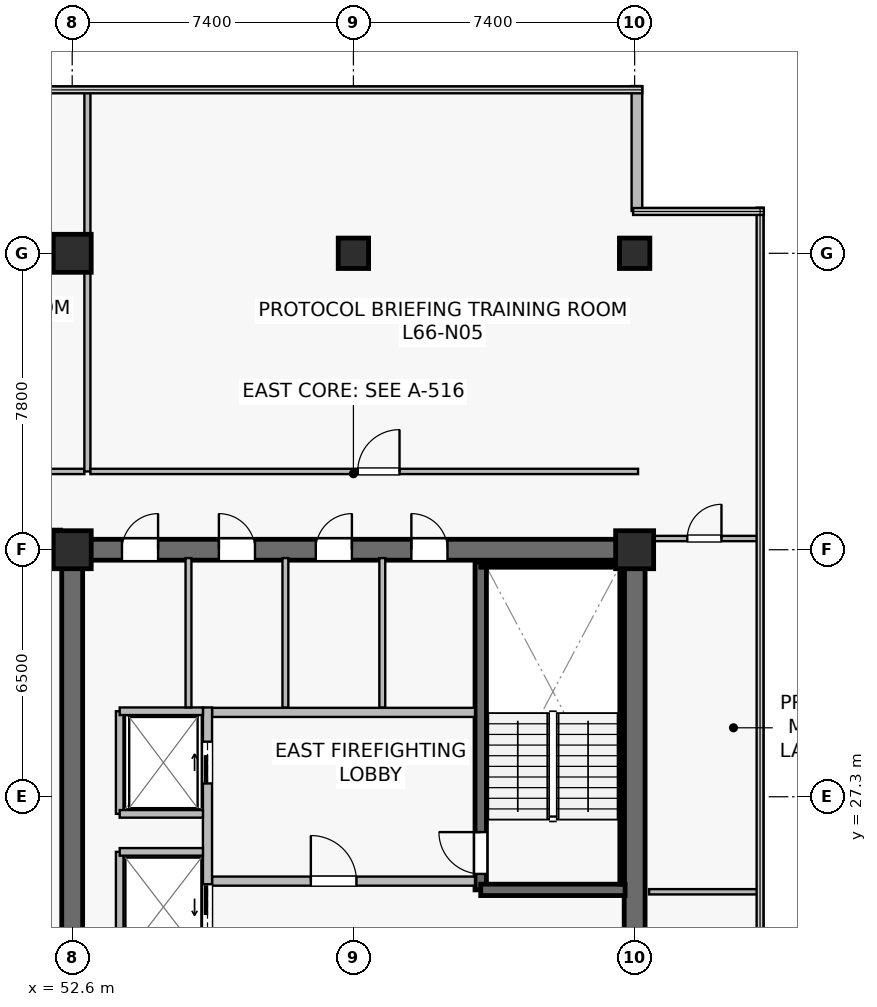
"""IFC4 building model, lengths in metres.
Left out: names, types, materials, properties, quantities, classifications, styles, units other than length and angle.
Written with IfcOpenShell. Run it as: python <this file> out.ifc"""

import sys

from ifc_helpers import new_model, si_unit, direction, frame, frame_2d, origin, origin_2d, place, context, subcontext, project, spatial, rectangle, extrude, source, transform, mapped, element, fill, save


model = new_model("IFC4")
c1 = context("Model", 3, precision=1e-05, world=origin(), true_north=direction((0.0, 1.0)))
c2 = subcontext(c1, "Body", "Model", "MODEL_VIEW")
j1 = project(units=[si_unit("LENGTHUNIT", "METRE"), si_unit("PLANEANGLEUNIT", "RADIAN")], contexts=[c1])
p1 = place(None, origin())
s1 = spatial("IfcSite", under=j1, at=p1, CompositionType="ELEMENT")
p2 = place(p1, origin())
s2 = spatial("IfcBuilding", under=s1, at=p2, CompositionType="ELEMENT")
p3 = place(p2, frame((0.0, 0.0, 275.2)))
s3 = spatial("IfcBuildingStorey", under=s2, at=p3, CompositionType="ELEMENT", Elevation=275.2)
p4 = place(p3, frame((52.325, 33.8, 0.0), z_axis=(0.0, 0.0, 1.0), x_axis=(1.0, 0.0, 0.0)))
e1 = element("IfcWall", 1, at=p4, inside=s3, PredefinedType="SHEAR", context=c2, shape_type="SweptSolid", body=[
    extrude(rectangle(XDim=15.35, YDim=0.55, at=frame_2d((7.675, 0.0))), origin(), (0.0, 0.0, 1.0), 3.8),
])
p5 = place(p4, frame((9.2, 0.0, 0.0)))
e2 = element("IfcOpeningElement", 2, at=p5, cuts=e1, PredefinedType="OPENING", context=c2, shape_type="SweptSolid", body=[
    extrude(rectangle(XDim=0.95, YDim=2.15, at=frame_2d((0.475, 1.075))), frame((0.0, 0.285, 0.0), z_axis=(0.0, -1.0, 0.0), x_axis=(1.0, 0.0, 0.0)), (0.0, 0.0, 1.0), 0.57),
])
p6 = place(p4, frame((6.685, 0.0, 0.0)))
e3 = element("IfcOpeningElement", 3, at=p6, cuts=e1, PredefinedType="OPENING", context=c2, shape_type="SweptSolid", body=[
    extrude(rectangle(XDim=0.95, YDim=2.15, at=frame_2d((0.475, 1.075))), frame((0.0, 0.285, 0.0), z_axis=(0.0, -1.0, 0.0), x_axis=(1.0, 0.0, 0.0)), (0.0, 0.0, 1.0), 0.57),
])
p7 = place(p4, frame((4.135, 0.0, 0.0)))
e4 = element("IfcOpeningElement", 4, at=p7, cuts=e1, PredefinedType="OPENING", context=c2, shape_type="SweptSolid", body=[
    extrude(rectangle(XDim=0.95, YDim=2.15, at=frame_2d((0.475, 1.075))), frame((0.0, 0.285, 0.0), z_axis=(0.0, -1.0, 0.0), x_axis=(1.0, 0.0, 0.0)), (0.0, 0.0, 1.0), 0.57),
])
p8 = place(p4, frame((1.585, 0.0, 0.0)))
e5 = element("IfcOpeningElement", 5, at=p8, cuts=e1, PredefinedType="OPENING", context=c2, shape_type="SweptSolid", body=[
    extrude(rectangle(XDim=0.95, YDim=2.15, at=frame_2d((0.475, 1.075))), frame((0.0, 0.285, 0.0), z_axis=(0.0, -1.0, 0.0), x_axis=(1.0, 0.0, 0.0)), (0.0, 0.0, 1.0), 0.57),
])
p9 = place(p3, frame((52.6, 15.075, 0.0), z_axis=(0.0, 0.0, 1.0), x_axis=(0.0, 1.0, 0.0)))
e6 = element("IfcWall", 6, at=p9, inside=s3, PredefinedType="SHEAR", context=c2, shape_type="SweptSolid", body=[
    extrude(rectangle(XDim=18.45, YDim=0.55, at=frame_2d((9.225, 0.0))), origin(), (0.0, 0.0, 1.0), 3.8),
])
p10 = place(p9, frame((3.475, 0.0, 0.0)))
e7 = element("IfcOpeningElement", 7, at=p10, cuts=e6, PredefinedType="OPENING", context=c2, shape_type="SweptSolid", body=[
    extrude(rectangle(XDim=1.42, YDim=2.2, at=frame_2d((0.71, 1.1))), frame((0.0, 0.285, 0.0), z_axis=(0.0, -1.0, 0.0), x_axis=(1.0, 0.0, 0.0)), (0.0, 0.0, 1.0), 0.57),
])
p11 = place(p3, frame((67.4, 15.075, 0.0), z_axis=(0.0, 0.0, 1.0), x_axis=(0.0, 1.0, 0.0)))
e8 = element("IfcWall", 8, at=p11, inside=s3, PredefinedType="SHEAR", context=c2, shape_type="SweptSolid", body=[
    extrude(rectangle(XDim=18.45, YDim=0.55, at=frame_2d((9.225, 0.0))), origin(), (0.0, 0.0, 1.0), 3.8),
])
p12 = place(p3, frame((63.35, 24.85, 0.0), z_axis=(0.0, 0.0, 1.0), x_axis=(0.0, 1.0, 0.0)))
e9 = element("IfcWall", 9, at=p12, inside=s3, PredefinedType="SHEAR", context=c2, shape_type="SweptSolid", body=[
    extrude(rectangle(XDim=8.63, YDim=0.3, at=frame_2d((4.315, 0.0))), origin(), (0.0, 0.0, 1.0), 3.8),
])
p13 = place(p12, frame((0.42, 0.0, 0.0)))
e10 = element("IfcOpeningElement", 10, at=p13, cuts=e9, PredefinedType="OPENING", context=c2, shape_type="SweptSolid", body=[
    extrude(rectangle(XDim=1.1, YDim=2.15, at=frame_2d((0.55, 1.075))), frame((0.0, 0.16, 0.0), z_axis=(0.0, -1.0, 0.0), x_axis=(1.0, 0.0, 0.0)), (0.0, 0.0, 1.0), 0.32),
])
p14 = place(p3, frame((63.35, 24.85, 0.0), z_axis=(0.0, 0.0, 1.0), x_axis=(1.0, 0.0, 0.0)))
e11 = element("IfcWall", 11, at=p14, inside=s3, PredefinedType="SHEAR", context=c2, shape_type="SweptSolid", body=[
    extrude(rectangle(XDim=3.8, YDim=0.3, at=frame_2d((1.9, 0.0))), origin(), (0.0, 0.0, 1.0), 3.8),
])
p15 = place(p3, frame((63.35, 33.4, 0.0), z_axis=(0.0, 0.0, 1.0), x_axis=(1.0, 0.0, 0.0)))
e12 = element("IfcWall", 12, at=p15, inside=s3, PredefinedType="SOLIDWALL", context=c2, shape_type="SweptSolid", body=[
    extrude(rectangle(XDim=3.72, YDim=0.12, at=frame_2d((1.86, 0.0))), origin(), (0.0, 0.0, 1.0), 3.8),
])
p16 = place(p3, frame((67.07, 25.0, 0.0), z_axis=(0.0, 0.0, 1.0), x_axis=(0.0, 1.0, 0.0)))
e13 = element("IfcWall", 13, at=p16, inside=s3, PredefinedType="SOLIDWALL", context=c2, shape_type="SweptSolid", body=[
    extrude(rectangle(XDim=8.32, YDim=0.12, at=frame_2d((4.16, 0.0))), origin(), (0.0, 0.0, 1.0), 3.8),
])
m1 = source(origin(), c2, "Body", "SweptSolid", [
    extrude(rectangle(XDim=1.0, YDim=1.0, at=origin_2d()), origin(), (0.0, 0.0, 1.0), 4.1),
])
for number, where, z_axis, x_axis in (
    (14, (52.6, 33.8, 0.0), (0.0, 0.0, 1.0), (1.0, 0.0, 0.0)),
    (15, (67.4, 33.8, 0.0), (0.0, 0.0, 1.0), (1.0, 0.0, 0.0)),
    (16, (52.6, 41.6, 0.0), (0.0, 0.0, 1.0), (1.0, 0.0, 0.0)),
):
    element("IfcColumn", number, at=place(p3, frame(where, z_axis=z_axis, x_axis=x_axis)), inside=s3, PredefinedType="COLUMN", context=c2, shape_type="MappedRepresentation", body=[
        mapped(m1, transform((0.0, 0.0, 0.0), scale=1.0)),
    ])
m2 = source(origin(), c2, "Body", "SweptSolid", [
    extrude(rectangle(XDim=0.8, YDim=0.8, at=origin_2d()), origin(), (0.0, 0.0, 1.0), 4.1),
])
for number, where, z_axis, x_axis in (
    (17, (60.0, 41.6, 0.0), (0.0, 0.0, 1.0), (1.0, 0.0, 0.0)),
    (18, (67.4, 41.6, 0.0), (0.0, 0.0, 1.0), (1.0, 0.0, 0.0)),
):
    element("IfcColumn", number, at=place(p3, frame(where, z_axis=z_axis, x_axis=x_axis)), inside=s3, PredefinedType="COLUMN", context=c2, shape_type="MappedRepresentation", body=[
        mapped(m2, transform((0.0, 0.0, 0.0), scale=1.0)),
    ])
p17 = place(p3, frame((67.46, 42.712, 0.0), z_axis=(0.0, 0.0, 1.0), x_axis=(0.0, 1.0, 0.0)))
e19 = element("IfcWall", 19, at=p17, inside=s3, PredefinedType="STANDARD", context=c2, shape_type="SweptSolid", body=[
    extrude(rectangle(XDim=3.288, YDim=0.28, at=frame_2d((1.644, 0.0))), origin(), (0.0, 0.0, 1.0), 3.8),
])
p18 = place(p3, frame((56.28, 25.08, 0.0), z_axis=(0.0, 0.0, 1.0), x_axis=(1.0, 0.0, 0.0)))
e20 = element("IfcWall", 20, at=p18, inside=s3, PredefinedType="SOLIDWALL", context=c2, shape_type="SweptSolid", body=[
    extrude(rectangle(XDim=6.92, YDim=0.24, at=frame_2d((3.46, 0.0))), origin(), (0.0, 0.0, 1.0), 3.197),
])
p19 = place(p18, frame((2.6, 0.0, 0.0)))
e21 = element("IfcOpeningElement", 21, at=p19, cuts=e20, PredefinedType="OPENING", context=c2, shape_type="SweptSolid", body=[
    extrude(rectangle(XDim=1.2, YDim=2.16, at=frame_2d((0.6, 1.08))), frame((0.0, 0.13, 0.0), z_axis=(0.0, -1.0, 0.0), x_axis=(1.0, 0.0, 0.0)), (0.0, 0.0, 1.0), 0.26),
])
p20 = place(p3, frame((56.28, 29.52, 0.0), z_axis=(0.0, 0.0, 1.0), x_axis=(1.0, 0.0, 0.0)))
e22 = element("IfcWall", 22, at=p20, inside=s3, PredefinedType="SOLIDWALL", context=c2, shape_type="SweptSolid", body=[
    extrude(rectangle(XDim=6.92, YDim=0.24, at=frame_2d((3.46, 0.0))), origin(), (0.0, 0.0, 1.0), 3.197),
])
p21 = place(p3, frame((56.16, 22.8, 0.0), z_axis=(0.0, 0.0, 1.0), x_axis=(0.0, 1.0, 0.0)))
e23 = element("IfcWall", 23, at=p21, inside=s3, PredefinedType="SOLIDWALL", context=c2, shape_type="SweptSolid", body=[
    extrude(rectangle(XDim=6.85, YDim=0.24, at=frame_2d((3.425, 0.0))), origin(), (0.0, 0.0, 1.0), 2.935),
])
p22 = place(p21, frame((4.85, 0.0, 0.0)))
e24 = element("IfcOpeningElement", 24, at=p22, cuts=e23, PredefinedType="OPENING", context=c2, shape_type="SweptSolid", body=[
    extrude(rectangle(XDim=1.1, YDim=2.22, at=frame_2d((0.55, 1.11))), frame((0.0, 0.13, 0.0), z_axis=(0.0, -1.0, 0.0), x_axis=(1.0, 0.0, 0.0)), (0.0, 0.0, 1.0), 0.26),
])
p23 = place(p21, frame((1.0, 0.0, 0.0)))
e25 = element("IfcOpeningElement", 25, at=p23, cuts=e23, PredefinedType="OPENING", context=c2, shape_type="SweptSolid", body=[
    extrude(rectangle(XDim=1.2, YDim=2.22, at=frame_2d((0.6, 1.11))), frame((0.0, 0.13, 0.0), z_axis=(0.0, -1.0, 0.0), x_axis=(1.0, 0.0, 0.0)), (0.0, 0.0, 1.0), 0.26),
])
p24 = place(p3, frame((53.85, 26.85, 0.0), z_axis=(0.0, 0.0, 1.0), x_axis=(0.0, 1.0, 0.0)))
e26 = element("IfcWall", 26, at=p24, inside=s3, PredefinedType="SOLIDWALL", context=c2, shape_type="SweptSolid", body=[
    extrude(rectangle(XDim=2.7, YDim=0.2, at=frame_2d((1.35, 0.0))), origin(), (0.0, 0.0, 1.0), 3.8),
])
p25 = place(p3, frame((53.85, 29.55, 0.0), z_axis=(0.0, 0.0, 1.0), x_axis=(1.0, 0.0, 0.0)))
e27 = element("IfcWall", 27, at=p25, inside=s3, PredefinedType="SOLIDWALL", context=c2, shape_type="SweptSolid", body=[
    extrude(rectangle(XDim=2.19, YDim=0.2, at=frame_2d((1.095, 0.0))), origin(), (0.0, 0.0, 1.0), 3.8),
])
p26 = place(p3, frame((53.85, 26.85, 0.0), z_axis=(0.0, 0.0, 1.0), x_axis=(1.0, 0.0, 0.0)))
e28 = element("IfcWall", 28, at=p26, inside=s3, PredefinedType="SOLIDWALL", context=c2, shape_type="SweptSolid", body=[
    extrude(rectangle(XDim=2.19, YDim=0.2, at=frame_2d((1.095, 0.0))), origin(), (0.0, 0.0, 1.0), 3.197),
])
p27 = place(p3, frame((53.85, 22.95, 0.0), z_axis=(0.0, 0.0, 1.0), x_axis=(0.0, 1.0, 0.0)))
e29 = element("IfcWall", 29, at=p27, inside=s3, PredefinedType="SOLIDWALL", context=c2, shape_type="SweptSolid", body=[
    extrude(rectangle(XDim=2.9, YDim=0.2, at=frame_2d((1.45, 0.0))), origin(), (0.0, 0.0, 1.0), 2.935),
])
p28 = place(p3, frame((53.85, 25.85, 0.0), z_axis=(0.0, 0.0, 1.0), x_axis=(1.0, 0.0, 0.0)))
e30 = element("IfcWall", 30, at=p28, inside=s3, PredefinedType="SOLIDWALL", context=c2, shape_type="SweptSolid", body=[
    extrude(rectangle(XDim=2.19, YDim=0.2, at=frame_2d((1.095, 0.0))), origin(), (0.0, 0.0, 1.0), 3.8),
])
for number, where, z_axis, x_axis in (
    (31, (60.76, 29.65, 0.0), (0.0, 0.0, 1.0), (0.0, 1.0, 0.0)),
    (32, (58.21, 29.65, 0.0), (0.0, 0.0, 1.0), (0.0, 1.0, 0.0)),
    (33, (55.66, 29.65, 0.0), (0.0, 0.0, 1.0), (0.0, 1.0, 0.0)),
):
    element("IfcWall", number, at=place(p3, frame(where, z_axis=z_axis, x_axis=x_axis)), inside=s3, PredefinedType="PLUMBINGWALL", context=c2, shape_type="SweptSolid", body=[
        extrude(rectangle(XDim=3.93, YDim=0.155, at=frame_2d((1.965, 0.0))), origin(), (0.0, 0.0, 1.0), 3.8),
    ])
p29 = place(p3, frame((48.3, 34.26, 0.0), z_axis=(0.0, 0.0, 1.0), x_axis=(1.0, 0.0, 0.0)))
e34 = element("IfcWall", 34, at=p29, inside=s3, PredefinedType="PARTITIONING", context=c2, shape_type="SweptSolid", body=[
    extrude(rectangle(XDim=4.025, YDim=0.175, at=frame_2d((2.012, 0.0))), origin(), (0.0, 0.0, 1.0), 3.535),
])
p30 = place(p3, frame((38.08, 35.86, 0.0), z_axis=(0.0, 0.0, 1.0), x_axis=(1.0, 0.0, 0.0)))
e35 = element("IfcWall", 35, at=p30, inside=s3, PredefinedType="PARTITIONING", context=c2, shape_type="SweptSolid", body=[
    extrude(rectangle(XDim=14.84, YDim=0.14, at=frame_2d((7.42, 0.0))), origin(), (0.0, 0.0, 1.0), 3.197),
])
p31 = place(p30, frame((5.696, 0.0, 0.0)))
e36 = element("IfcOpeningElement", 36, at=p31, cuts=e35, PredefinedType="OPENING", context=c2, shape_type="SweptSolid", body=[
    extrude(rectangle(XDim=1.1, YDim=2.18, at=frame_2d((0.55, 1.09))), frame((0.0, 0.08, 0.0), z_axis=(0.0, -1.0, 0.0), x_axis=(1.0, 0.0, 0.0)), (0.0, 0.0, 1.0), 0.16),
])
p32 = place(p3, frame((53.0, 35.86, 0.0), z_axis=(0.0, 0.0, 1.0), x_axis=(0.0, 1.0, 0.0)))
e37 = element("IfcWall", 37, at=p32, inside=s3, PredefinedType="PARTITIONING", context=c2, shape_type="SweptSolid", body=[
    extrude(rectangle(XDim=10.03, YDim=0.16, at=frame_2d((5.015, 0.0))), origin(), (0.0, 0.0, 1.0), 3.135),
])
p33 = place(p3, frame((53.08, 35.86, 0.0), z_axis=(0.0, 0.0, 1.0), x_axis=(1.0, 0.0, 0.0)))
e38 = element("IfcWall", 38, at=p33, inside=s3, PredefinedType="PARTITIONING", context=c2, shape_type="SweptSolid", body=[
    extrude(rectangle(XDim=14.41, YDim=0.14, at=frame_2d((7.205, 0.0))), origin(), (0.0, 0.0, 1.0), 3.197),
])
p34 = place(p33, frame((7.033, 0.0, 0.0)))
e39 = element("IfcOpeningElement", 39, at=p34, cuts=e38, PredefinedType="OPENING", context=c2, shape_type="SweptSolid", body=[
    extrude(rectangle(XDim=1.1, YDim=2.18, at=frame_2d((0.55, 1.09))), frame((0.0, 0.08, 0.0), z_axis=(0.0, -1.0, 0.0), x_axis=(1.0, 0.0, 0.0)), (0.0, 0.0, 1.0), 0.16),
])
p35 = place(p3, frame((67.78, 24.8, 0.0), z_axis=(0.0, 0.0, 1.0), x_axis=(1.0, 0.0, 0.0)))
e40 = element("IfcWall", 40, at=p35, inside=s3, PredefinedType="PARTITIONING", context=c2, shape_type="SweptSolid", body=[
    extrude(rectangle(XDim=2.91, YDim=0.14, at=frame_2d((1.455, 0.0))), origin(), (0.0, 0.0, 1.0), 3.8),
])
p36 = place(p3, frame((67.78, 34.095, 0.0), z_axis=(0.0, 0.0, 1.0), x_axis=(1.0, 0.0, 0.0)))
e41 = element("IfcWall", 41, at=p36, inside=s3, PredefinedType="PARTITIONING", context=c2, shape_type="SweptSolid", body=[
    extrude(rectangle(XDim=2.91, YDim=0.14, at=frame_2d((1.455, 0.0))), origin(), (0.0, 0.0, 1.0), 3.8),
])
p37 = place(p36, frame((1.005, 0.0, 0.0)))
e42 = element("IfcOpeningElement", 42, at=p37, cuts=e41, PredefinedType="OPENING", context=c2, shape_type="SweptSolid", body=[
    extrude(rectangle(XDim=0.9, YDim=2.1, at=frame_2d((0.45, 1.05))), frame((0.0, 0.08, 0.0), z_axis=(0.0, -1.0, 0.0), x_axis=(1.0, 0.0, 0.0)), (0.0, 0.0, 1.0), 0.16),
])
m3 = source(origin(), c2, "Body", "SweptSolid", [
    extrude(rectangle(XDim=1.1, YDim=2.15, at=frame_2d((0.55, 1.075))), frame((0.0, 0.025, 0.0), z_axis=(0.0, -1.0, 0.0), x_axis=(1.0, 0.0, 0.0)), (0.0, 0.0, 1.0), 0.05),
])
p38 = place(p13, origin())
e43 = element("IfcDoor", 43, at=p38, inside=s3, OperationType="SINGLE_SWING_RIGHT", PredefinedType="DOOR", context=c2, shape_type="MappedRepresentation", body=[
    mapped(m3, transform((0.0, 0.0, 0.0), scale=1.0)),
])
fill(e10, e43)
m4 = source(origin(), c2, "Body", "SweptSolid", [
    extrude(rectangle(XDim=1.2, YDim=2.16, at=frame_2d((0.6, 1.08))), frame((0.0, 0.025, 0.0), z_axis=(0.0, -1.0, 0.0), x_axis=(1.0, 0.0, 0.0)), (0.0, 0.0, 1.0), 0.05),
])
p39 = place(p19, origin())
e44 = element("IfcDoor", 44, at=p39, inside=s3, OperationType="SINGLE_SWING_LEFT", PredefinedType="DOOR", context=c2, shape_type="MappedRepresentation", body=[
    mapped(m4, transform((0.0, 0.0, 0.0), scale=1.0)),
])
fill(e21, e44)
m5 = source(origin(), c2, "Body", "SweptSolid", [
    extrude(rectangle(XDim=1.1, YDim=2.22, at=frame_2d((0.55, 1.11))), frame((0.0, 0.025, 0.0), z_axis=(0.0, -1.0, 0.0), x_axis=(1.0, 0.0, 0.0)), (0.0, 0.0, 1.0), 0.05),
])
p40 = place(p22, origin())
e45 = element("IfcDoor", 45, at=p40, inside=s3, OperationType="SLIDING_TO_RIGHT", PredefinedType="USERDEFINED", context=c2, shape_type="MappedRepresentation", body=[
    mapped(m5, transform((0.0, 0.0, 0.0), scale=1.0)),
])
fill(e24, e45)
m6 = source(origin(), c2, "Body", "SweptSolid", [
    extrude(rectangle(XDim=1.2, YDim=2.22, at=frame_2d((0.6, 1.11))), frame((0.0, 0.025, 0.0), z_axis=(0.0, -1.0, 0.0), x_axis=(1.0, 0.0, 0.0)), (0.0, 0.0, 1.0), 0.05),
])
p41 = place(p23, origin())
e46 = element("IfcDoor", 46, at=p41, inside=s3, OperationType="SLIDING_TO_LEFT", PredefinedType="USERDEFINED", context=c2, shape_type="MappedRepresentation", body=[
    mapped(m6, transform((0.0, 0.0, 0.0), scale=1.0)),
])
fill(e25, e46)
m7 = source(origin(), c2, "Body", "SweptSolid", [
    extrude(rectangle(XDim=0.95, YDim=2.15, at=frame_2d((0.475, 1.075))), frame((0.0, 0.025, 0.0), z_axis=(0.0, -1.0, 0.0), x_axis=(1.0, 0.0, 0.0)), (0.0, 0.0, 1.0), 0.05),
])
p42 = place(p5, origin())
e47 = element("IfcDoor", 47, at=p42, inside=s3, OperationType="SINGLE_SWING_LEFT", PredefinedType="DOOR", context=c2, shape_type="MappedRepresentation", body=[
    mapped(m7, transform((0.0, 0.0, 0.0), scale=1.0)),
])
fill(e2, e47)
p43 = place(p6, origin())
e48 = element("IfcDoor", 48, at=p43, inside=s3, OperationType="SINGLE_SWING_RIGHT", PredefinedType="DOOR", context=c2, shape_type="MappedRepresentation", body=[
    mapped(m7, transform((0.0, 0.0, 0.0), scale=1.0)),
])
fill(e3, e48)
p44 = place(p7, origin())
e49 = element("IfcDoor", 49, at=p44, inside=s3, OperationType="SINGLE_SWING_LEFT", PredefinedType="DOOR", context=c2, shape_type="MappedRepresentation", body=[
    mapped(m7, transform((0.0, 0.0, 0.0), scale=1.0)),
])
fill(e4, e49)
p45 = place(p8, origin())
e50 = element("IfcDoor", 50, at=p45, inside=s3, OperationType="SINGLE_SWING_RIGHT", PredefinedType="DOOR", context=c2, shape_type="MappedRepresentation", body=[
    mapped(m7, transform((0.0, 0.0, 0.0), scale=1.0)),
])
fill(e5, e50)
m8 = source(origin(), c2, "Body", "SweptSolid", [
    extrude(rectangle(XDim=1.1, YDim=2.18, at=frame_2d((0.55, 1.09))), frame((0.0, 0.025, 0.0), z_axis=(0.0, -1.0, 0.0), x_axis=(1.0, 0.0, 0.0)), (0.0, 0.0, 1.0), 0.05),
])
p46 = place(p34, origin())
e51 = element("IfcDoor", 51, at=p46, inside=s3, OperationType="SINGLE_SWING_RIGHT", PredefinedType="DOOR", context=c2, shape_type="MappedRepresentation", body=[
    mapped(m8, transform((0.0, 0.0, 0.0), scale=1.0)),
])
fill(e39, e51)
m9 = source(origin(), c2, "Body", "SweptSolid", [
    extrude(rectangle(XDim=0.9, YDim=2.1, at=frame_2d((0.45, 1.05))), frame((0.0, 0.025, 0.0), z_axis=(0.0, -1.0, 0.0), x_axis=(1.0, 0.0, 0.0)), (0.0, 0.0, 1.0), 0.05),
])
p47 = place(p37, origin())
e52 = element("IfcDoor", 52, at=p47, inside=s3, OperationType="SINGLE_SWING_RIGHT", PredefinedType="DOOR", context=c2, shape_type="MappedRepresentation", body=[
    mapped(m9, transform((0.0, 0.0, 0.0), scale=1.0)),
])
fill(e42, e52)
save(model, sys.argv[1])
